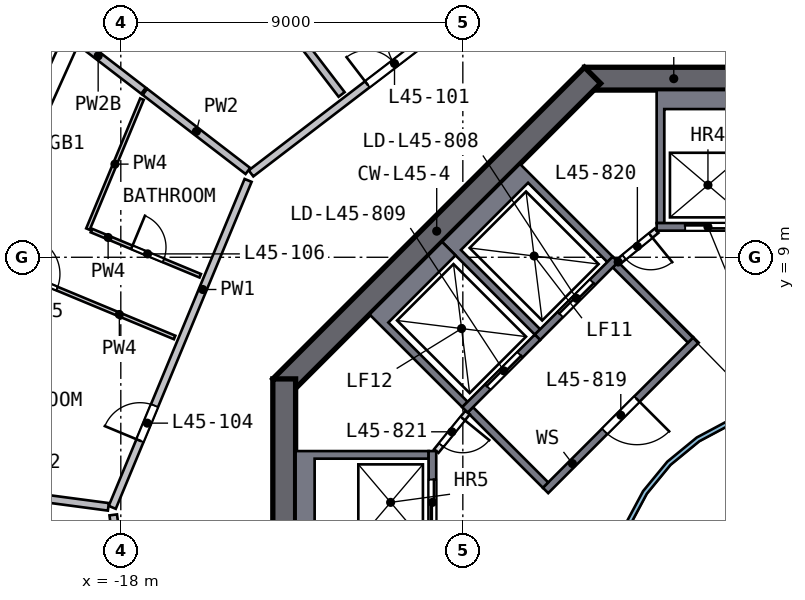
"""IFC4 building model, lengths in metres.
Left out: names, types, materials, properties, quantities, classifications, styles, units other than length and angle.
Written with IfcOpenShell. Run it as: python <this file> out.ifc"""

import sys

from ifc_helpers import new_model, si_unit, direction, frame, frame_2d, origin, place, context, subcontext, project, spatial, polyline, rectangle, outline, extrude, element, fill, save


model = new_model("IFC4")
c1 = context("Model", 3, precision=1e-05, world=origin(), true_north=direction((0.0, 1.0)))
c2 = subcontext(c1, "Body", "Model", "MODEL_VIEW")
j1 = project(units=[si_unit("LENGTHUNIT", "METRE"), si_unit("PLANEANGLEUNIT", "RADIAN")], contexts=[c1])
p1 = place(None, origin())
s1 = spatial("IfcSite", under=j1, at=p1, CompositionType="ELEMENT")
p2 = place(p1, origin())
s2 = spatial("IfcBuilding", under=s1, at=p2, CompositionType="ELEMENT")
p3 = place(p2, frame((0.0, 0.0, 187.0)))
s3 = spatial("IfcBuildingStorey", under=s2, at=p3, CompositionType="ELEMENT", Elevation=187.0)
p4 = place(p3, frame((5.799, 13.7, 0.0), z_axis=(0.0, 0.0, 1.0), x_axis=(-1.0, 0.0, 0.0)))
e1 = element("IfcWall", 1, at=p4, inside=s3, PredefinedType="SHEAR", context=c2, shape_type="SweptSolid", body=[
    extrude(rectangle(XDim=11.598, YDim=0.6, at=frame_2d((5.799, 0.0))), origin(), (0.0, 0.0, 1.0), 3.5),
])
p5 = place(p4, frame((4.899, 0.0, 0.0)))
e2 = element("IfcOpeningElement", 2, at=p5, cuts=e1, PredefinedType="OPENING", context=c2, shape_type="SweptSolid", body=[
    extrude(rectangle(XDim=1.8, YDim=2.1, at=frame_2d((0.9, 1.05))), frame((0.0, 0.31, 0.0), z_axis=(0.0, -1.0, 0.0), x_axis=(1.0, 0.0, 0.0)), (0.0, 0.0, 1.0), 0.62),
])
p6 = place(p3, frame((-5.587, 13.788, 0.0), z_axis=(0.0, 0.0, 1.0), x_axis=(-0.707106781, -0.707106781, 0.0)))
e3 = element("IfcWall", 3, at=p6, inside=s3, PredefinedType="SHEAR", context=c2, shape_type="SweptSolid", body=[
    extrude(rectangle(XDim=11.598, YDim=0.6, at=frame_2d((5.799, 0.0))), origin(), (0.0, 0.0, 1.0), 3.5),
])
p7 = place(p3, frame((-13.7, 5.799, 0.0), z_axis=(0.0, 0.0, 1.0), x_axis=(0.0, -1.0, 0.0)))
e4 = element("IfcWall", 4, at=p7, inside=s3, PredefinedType="SHEAR", context=c2, shape_type="SweptSolid", body=[
    extrude(rectangle(XDim=11.598, YDim=0.6, at=frame_2d((5.799, 0.0))), origin(), (0.0, 0.0, 1.0), 3.5),
])
p8 = place(p7, frame((4.899, 0.0, 0.0)))
e5 = element("IfcOpeningElement", 5, at=p8, cuts=e4, PredefinedType="OPENING", context=c2, shape_type="SweptSolid", body=[
    extrude(rectangle(XDim=1.8, YDim=2.1, at=frame_2d((0.9, 1.05))), frame((0.0, 0.31, 0.0), z_axis=(0.0, -1.0, 0.0), x_axis=(1.0, 0.0, 0.0)), (0.0, 0.0, 1.0), 0.62),
])
p9 = place(p3, origin())
e6 = element("IfcWall", 6, at=p9, inside=s3, PredefinedType="SOLIDWALL", context=c2, shape_type="SweptSolid", body=[
    extrude(outline(polyline([(-3.9, 13.4), (-1.2, 13.4), (-1.2, 9.9), (-1.4, 9.9), (-1.4, 12.9), (-3.7, 12.9), (-3.7, 9.9), (-3.9, 9.9), (-3.9, 13.4)])), origin(), (0.0, 0.0, 1.0), 3.19),
])
p10 = place(p3, frame((-1.2, 9.8, 0.0), z_axis=(0.0, 0.0, 1.0), x_axis=(-1.0, 0.0, 0.0)))
e7 = element("IfcWall", 7, at=p10, inside=s3, PredefinedType="SOLIDWALL", context=c2, shape_type="SweptSolid", body=[
    extrude(rectangle(XDim=2.7, YDim=0.2, at=frame_2d((1.35, 0.0))), origin(), (0.0, 0.0, 1.0), 3.19),
])
p11 = place(p10, frame((0.75, 0.0, 0.0)))
e8 = element("IfcOpeningElement", 8, at=p11, cuts=e7, PredefinedType="OPENING", context=c2, shape_type="SweptSolid", body=[
    extrude(rectangle(XDim=1.2, YDim=2.1, at=frame_2d((0.6, 1.05))), frame((0.0, 0.11, 0.0), z_axis=(0.0, -1.0, 0.0), x_axis=(1.0, 0.0, 0.0)), (0.0, 0.0, 1.0), 0.22),
])
p12 = place(p3, origin())
e9 = element("IfcWall", 9, at=p12, inside=s3, PredefinedType="SOLIDWALL", context=c2, shape_type="SweptSolid", body=[
    extrude(outline(polyline([(-13.4, 3.9), (-9.9, 3.9), (-9.9, 3.7), (-12.9, 3.7), (-12.9, 1.4), (-9.9, 1.4), (-9.9, 1.2), (-13.4, 1.2), (-13.4, 3.9)])), origin(), (0.0, 0.0, 1.0), 3.19),
])
p13 = place(p3, frame((-9.8, 1.2, 0.0), z_axis=(0.0, 0.0, 1.0), x_axis=(0.0, 1.0, 0.0)))
e10 = element("IfcWall", 10, at=p13, inside=s3, PredefinedType="SOLIDWALL", context=c2, shape_type="SweptSolid", body=[
    extrude(rectangle(XDim=2.7, YDim=0.2, at=frame_2d((1.35, 0.0))), origin(), (0.0, 0.0, 1.0), 3.19),
])
p14 = place(p13, frame((0.75, 0.0, 0.0)))
e11 = element("IfcOpeningElement", 11, at=p14, cuts=e10, PredefinedType="OPENING", context=c2, shape_type="SweptSolid", body=[
    extrude(rectangle(XDim=1.2, YDim=2.1, at=frame_2d((0.6, 1.05))), frame((0.0, 0.11, 0.0), z_axis=(0.0, -1.0, 0.0), x_axis=(1.0, 0.0, 0.0)), (0.0, 0.0, 1.0), 0.22),
])
p15 = place(p3, origin())
e12 = element("IfcWall", 12, at=p15, inside=s3, PredefinedType="SOLIDWALL", context=c2, shape_type="SweptSolid", body=[
    extrude(outline(polyline([(-9.546, 9.405), (-7.495, 11.455), (-5.056, 9.016), (-5.197, 8.874), (-7.283, 10.96), (-9.051, 9.192), (-6.965, 7.106), (-7.106, 6.965), (-9.546, 9.405)])), origin(), (0.0, 0.0, 1.0), 3.19),
])
p16 = place(p3, frame((-4.985, 8.945, 0.0), z_axis=(0.0, 0.0, 1.0), x_axis=(-0.707106781, -0.707106781, 0.0)))
e13 = element("IfcWall", 13, at=p16, inside=s3, PredefinedType="SOLIDWALL", context=c2, shape_type="SweptSolid", body=[
    extrude(rectangle(XDim=2.9, YDim=0.2, at=frame_2d((1.45, 0.0))), origin(), (0.0, 0.0, 1.0), 3.19),
])
p17 = place(p16, frame((0.85, 0.0, 0.0)))
e14 = element("IfcOpeningElement", 14, at=p17, cuts=e13, PredefinedType="OPENING", context=c2, shape_type="SweptSolid", body=[
    extrude(rectangle(XDim=1.2, YDim=2.1, at=frame_2d((0.6, 1.05))), frame((0.0, 0.11, 0.0), z_axis=(0.0, -1.0, 0.0), x_axis=(1.0, 0.0, 0.0)), (0.0, 0.0, 1.0), 0.22),
])
p18 = place(p3, origin())
e15 = element("IfcWall", 15, at=p18, inside=s3, PredefinedType="SOLIDWALL", context=c2, shape_type="SweptSolid", body=[
    extrude(outline(polyline([(-11.455, 7.495), (-9.546, 9.405), (-9.192, 9.051), (-10.96, 7.283), (-8.874, 5.197), (-9.016, 5.056), (-11.455, 7.495)])), origin(), (0.0, 0.0, 1.0), 3.19),
])
p19 = place(p3, frame((-7.036, 6.894, 0.0), z_axis=(0.0, 0.0, 1.0), x_axis=(-0.707106781, -0.707106781, 0.0)))
e16 = element("IfcWall", 16, at=p19, inside=s3, PredefinedType="SOLIDWALL", context=c2, shape_type="SweptSolid", body=[
    extrude(rectangle(XDim=2.7, YDim=0.2, at=frame_2d((1.35, 0.0))), origin(), (0.0, 0.0, 1.0), 3.19),
])
p20 = place(p19, frame((0.65, 0.0, 0.0)))
e17 = element("IfcOpeningElement", 17, at=p20, cuts=e16, PredefinedType="OPENING", context=c2, shape_type="SweptSolid", body=[
    extrude(rectangle(XDim=1.2, YDim=2.1, at=frame_2d((0.6, 1.05))), frame((0.0, 0.11, 0.0), z_axis=(0.0, -1.0, 0.0), x_axis=(1.0, 0.0, 0.0)), (0.0, 0.0, 1.0), 0.22),
])
p21 = place(p3, frame((-2.864, 6.823, 0.0), z_axis=(0.0, 0.0, 1.0), x_axis=(-0.707106781, -0.707106781, 0.0)))
e18 = element("IfcWall", 18, at=p21, inside=s3, PredefinedType="SOLIDWALL", context=c2, shape_type="SweptSolid", body=[
    extrude(rectangle(XDim=5.6, YDim=0.2, at=frame_2d((2.8, 0.0))), origin(), (0.0, 0.0, 1.0), 3.19),
])
p22 = place(p21, frame((2.2, 0.0, 0.0)))
e19 = element("IfcOpeningElement", 19, at=p22, cuts=e18, PredefinedType="OPENING", context=c2, shape_type="SweptSolid", body=[
    extrude(rectangle(XDim=1.2, YDim=2.1, at=frame_2d((0.6, 1.05))), frame((0.0, 0.11, 0.0), z_axis=(0.0, -1.0, 0.0), x_axis=(1.0, 0.0, 0.0)), (0.0, 0.0, 1.0), 0.22),
])
for number, where, z_axis, x_axis in (
    (20, (-3.005, 6.823, 0.0), (0.0, 0.0, 1.0), (-0.707, 0.707, 0.0)),
    (21, (-6.823, 3.005, 0.0), (0.0, 0.0, 1.0), (-0.707, 0.707, 0.0)),
):
    element("IfcWall", number, at=place(p3, frame(where, z_axis=z_axis, x_axis=x_axis)), inside=s3, PredefinedType="SOLIDWALL", context=c2, shape_type="SweptSolid", body=[
        extrude(rectangle(XDim=2.8, YDim=0.2, at=frame_2d((1.4, 0.0))), origin(), (0.0, 0.0, 1.0), 3.19),
    ])
p23 = place(p3, frame((-3.9, 9.7, 0.0), z_axis=(0.0, 0.0, 1.0), x_axis=(-0.775559878, -0.631274009, 0.0)))
e22 = element("IfcWall", 22, at=p23, inside=s3, PredefinedType="PARTITIONING", context=c2, shape_type="SweptSolid", body=[
    extrude(rectangle(XDim=1.308, YDim=0.15, at=frame_2d((0.654, 0.0))), origin(), (0.0, 0.0, 1.0), 3.19),
])
p24 = place(p23, frame((0.204, 0.0, 0.0)))
e23 = element("IfcOpeningElement", 23, at=p24, cuts=e22, PredefinedType="OPENING", context=c2, shape_type="SweptSolid", body=[
    extrude(rectangle(XDim=0.9, YDim=2.1, at=frame_2d((0.45, 1.05))), frame((0.0, 0.085, 0.0), z_axis=(0.0, -1.0, 0.0), x_axis=(1.0, 0.0, 0.0)), (0.0, 0.0, 1.0), 0.17),
])
p25 = place(p3, frame((-8.874, 4.914, 0.0), z_axis=(0.0, 0.0, 1.0), x_axis=(-0.631274009, -0.775559878, 0.0)))
e24 = element("IfcWall", 24, at=p25, inside=s3, PredefinedType="PARTITIONING", context=c2, shape_type="SweptSolid", body=[
    extrude(rectangle(XDim=1.308, YDim=0.15, at=frame_2d((0.654, 0.0))), origin(), (0.0, 0.0, 1.0), 3.19),
])
p26 = place(p25, frame((0.204, 0.0, 0.0)))
e25 = element("IfcOpeningElement", 25, at=p26, cuts=e24, PredefinedType="OPENING", context=c2, shape_type="SweptSolid", body=[
    extrude(rectangle(XDim=0.9, YDim=2.1, at=frame_2d((0.45, 1.05))), frame((0.0, 0.085, 0.0), z_axis=(0.0, -1.0, 0.0), x_axis=(1.0, 0.0, 0.0)), (0.0, 0.0, 1.0), 0.17),
])
p27 = place(p3, origin())
e26 = element("IfcWall", 26, at=p27, inside=s3, PredefinedType="SOLIDWALL", context=c2, shape_type="SweptSolid", body=[
    extrude(outline(polyline([(5.021, -0.999), (4.73, -1.959), (4.257, -2.844), (3.62, -3.62), (2.844, -4.257), (1.959, -4.73), (0.999, -5.021), (0.0, -5.12), (-0.999, -5.021), (-1.959, -4.73), (-2.844, -4.257), (-3.62, -3.62), (-4.257, -2.844), (-4.73, -1.959), (-5.021, -0.999), (-5.12, 0.0), (-5.021, 0.999), (-4.73, 1.959), (-4.257, 2.844), (-3.62, 3.62), (-2.844, 4.257), (-1.959, 4.73), (-0.999, 5.021), (0.0, 5.12), (0.999, 5.021), (1.959, 4.73), (2.844, 4.257), (3.62, 3.62), (4.257, 2.844), (4.73, 1.959), (5.021, 0.999), (5.12, 0.0), (5.021, -0.999)]), holes=[polyline([(4.904, 0.976), (4.619, 1.913), (4.157, 2.778), (3.535, 3.535), (2.778, 4.157), (1.913, 4.619), (0.976, 4.904), (0.0, 5.0), (-0.976, 4.904), (-1.913, 4.619), (-2.778, 4.157), (-3.535, 3.535), (-4.157, 2.778), (-4.619, 1.913), (-4.904, 0.976), (-5.0, 0.0), (-4.904, -0.976), (-4.619, -1.913), (-4.157, -2.778), (-3.535, -3.535), (-2.778, -4.157), (-1.913, -4.619), (-0.976, -4.904), (0.0, -5.0), (0.976, -4.904), (1.913, -4.619), (2.778, -4.157), (3.535, -3.535), (4.157, -2.778), (4.619, -1.913), (4.904, -0.976), (5.0, 0.0), (4.904, 0.976)])]), origin(), (0.0, 0.0, 1.0), 3.19),
])
p28 = place(p3, frame((-16.993, -7.018, 0.0), z_axis=(0.0, 0.0, 1.0), x_axis=(-0.129502741, 0.991579064, 0.0)))
e27 = element("IfcWall", 27, at=p28, inside=s3, PredefinedType="SOLIDWALL", context=c2, shape_type="SweptSolid", body=[
    extrude(rectangle(XDim=9.317, YDim=0.2, at=frame_2d((4.658, 0.0))), origin(), (0.0, 0.0, 1.0), 3.19),
])
p29 = place(p28, frame((1.9, 0.0, 0.0)))
e28 = element("IfcOpeningElement", 28, at=p29, cuts=e27, PredefinedType="OPENING", context=c2, shape_type="SweptSolid", body=[
    extrude(rectangle(XDim=1.0, YDim=2.1, at=frame_2d((0.5, 1.05))), frame((0.0, 0.11, 0.0), z_axis=(0.0, -1.0, 0.0), x_axis=(1.0, 0.0, 0.0)), (0.0, 0.0, 1.0), 0.22),
])
p30 = place(p3, frame((-18.225, 2.419, 0.0), z_axis=(0.0, 0.0, 1.0), x_axis=(0.383660652, 0.923474149, 0.0)))
e29 = element("IfcWall", 29, at=p30, inside=s3, PredefinedType="SOLIDWALL", context=c2, shape_type="SweptSolid", body=[
    extrude(rectangle(XDim=9.317, YDim=0.2, at=frame_2d((4.658, 0.0))), origin(), (0.0, 0.0, 1.0), 3.19),
])
p31 = place(p30, frame((1.9, 0.0, 0.0)))
e30 = element("IfcOpeningElement", 30, at=p31, cuts=e29, PredefinedType="OPENING", context=c2, shape_type="SweptSolid", body=[
    extrude(rectangle(XDim=1.0, YDim=2.1, at=frame_2d((0.5, 1.05))), frame((0.0, 0.11, 0.0), z_axis=(0.0, -1.0, 0.0), x_axis=(1.0, 0.0, 0.0)), (0.0, 0.0, 1.0), 0.22),
])
p32 = place(p3, frame((-14.574, 11.207, 0.0), z_axis=(0.0, 0.0, 1.0), x_axis=(0.793994332, 0.60792516, 0.0)))
e31 = element("IfcWall", 31, at=p32, inside=s3, PredefinedType="SOLIDWALL", context=c2, shape_type="SweptSolid", body=[
    extrude(rectangle(XDim=9.517, YDim=0.2, at=frame_2d((4.758, 0.0))), origin(), (0.0, 0.0, 1.0), 3.19),
])
p33 = place(p32, frame((3.856, 0.0, 0.0)))
e32 = element("IfcOpeningElement", 32, at=p33, cuts=e31, PredefinedType="OPENING", context=c2, shape_type="SweptSolid", body=[
    extrude(rectangle(XDim=1.8, YDim=2.1, at=frame_2d((0.9, 1.05))), frame((0.0, 0.11, 0.0), z_axis=(0.0, -1.0, 0.0), x_axis=(1.0, 0.0, 0.0)), (0.0, 0.0, 1.0), 0.22),
])
p34 = place(p3, frame((-18.328, 2.432, 0.0), z_axis=(0.0, 0.0, 1.0), x_axis=(-0.991308802, 0.131555534, 0.0)))
e33 = element("IfcWall", 33, at=p34, inside=s3, PredefinedType="SOLIDWALL", context=c2, shape_type="SweptSolid", body=[
    extrude(rectangle(XDim=3.418, YDim=0.2, at=frame_2d((1.709, 0.0))), origin(), (0.0, 0.0, 1.0), 3.19),
])
p35 = place(p3, frame((-17.402, 13.382, 0.0), z_axis=(0.0, 0.0, 1.0), x_axis=(-0.792684259, 0.609632402, 0.0)))
e34 = element("IfcWall", 34, at=p35, inside=s3, PredefinedType="SOLIDWALL", context=c2, shape_type="SweptSolid", body=[
    extrude(rectangle(XDim=3.011, YDim=0.2, at=frame_2d((1.506, 0.0))), origin(), (0.0, 0.0, 1.0), 2.69),
])
p36 = place(p3, frame((-12.19, 13.285, 0.0), z_axis=(0.0, 0.0, 1.0), x_axis=(-0.607936243, 0.793985846, 0.0)))
e35 = element("IfcWall", 35, at=p36, inside=s3, PredefinedType="SOLIDWALL", context=c2, shape_type="SweptSolid", body=[
    extrude(rectangle(XDim=14.108, YDim=0.2, at=frame_2d((7.054, 0.0))), origin(), (0.0, 0.0, 1.0), 3.19),
])
p37 = place(p36, frame((4.35, 0.0, 0.0)))
e36 = element("IfcOpeningElement", 36, at=p37, cuts=e35, PredefinedType="OPENING", context=c2, shape_type="SweptSolid", body=[
    extrude(rectangle(XDim=1.0, YDim=2.1, at=frame_2d((0.5, 1.05))), frame((0.0, 0.11, 0.0), z_axis=(0.0, -1.0, 0.0), x_axis=(1.0, 0.0, 0.0)), (0.0, 0.0, 1.0), 0.22),
])
p38 = place(p3, frame((-14.656, 11.27, 0.0), z_axis=(0.0, 0.0, 1.0), x_axis=(-0.792682395, 0.609634825, 0.0)))
e37 = element("IfcWall", 37, at=p38, inside=s3, PredefinedType="SOLIDWALL", context=c2, shape_type="SweptSolid", body=[
    extrude(rectangle(XDim=3.418, YDim=0.2, at=frame_2d((1.709, 0.0))), origin(), (0.0, 0.0, 1.0), 3.19),
])
p39 = place(p3, frame((-22.263, 9.249, 0.0), z_axis=(0.0, 0.0, 1.0), x_axis=(0.923469886, -0.383670913, 0.0)))
e38 = element("IfcWall", 38, at=p39, inside=s3, PredefinedType="PARTITIONING", context=c2, shape_type="SweptSolid", body=[
    extrude(rectangle(XDim=6.15, YDim=0.1, at=frame_2d((3.075, 0.0))), origin(), (0.0, 0.0, 1.0), 3.19),
])
p40 = place(p39, frame((1.8, 0.0, 0.0)))
e39 = element("IfcOpeningElement", 39, at=p40, cuts=e38, PredefinedType="OPENING", context=c2, shape_type="SweptSolid", body=[
    extrude(rectangle(XDim=1.0, YDim=2.1, at=frame_2d((0.5, 1.05))), frame((0.0, 0.06, 0.0), z_axis=(0.0, -1.0, 0.0), x_axis=(1.0, 0.0, 0.0)), (0.0, 0.0, 1.0), 0.12),
])
p41 = place(p3, frame((-17.444, 13.162, 0.0), z_axis=(0.0, 0.0, 1.0), x_axis=(-0.383688487, -0.923462584, 0.0)))
e40 = element("IfcWall", 40, at=p41, inside=s3, PredefinedType="PARTITIONING", context=c2, shape_type="SweptSolid", body=[
    extrude(rectangle(XDim=3.704, YDim=0.1, at=frame_2d((1.852, 0.0))), origin(), (0.0, 0.0, 1.0), 3.19),
])
p42 = place(p3, frame((-18.772, 9.703, 0.0), z_axis=(0.0, 0.0, 1.0), x_axis=(0.923463234, -0.383686924, 0.0)))
e41 = element("IfcWall", 41, at=p42, inside=s3, PredefinedType="PARTITIONING", context=c2, shape_type="SweptSolid", body=[
    extrude(rectangle(XDim=3.1, YDim=0.1, at=frame_2d((1.55, 0.0))), origin(), (0.0, 0.0, 1.0), 3.19),
])
p43 = place(p42, frame((1.15, 0.0, 0.0)))
e42 = element("IfcOpeningElement", 42, at=p43, cuts=e41, PredefinedType="OPENING", context=c2, shape_type="SweptSolid", body=[
    extrude(rectangle(XDim=0.9, YDim=2.1, at=frame_2d((0.45, 1.05))), frame((0.0, 0.06, 0.0), z_axis=(0.0, -1.0, 0.0), x_axis=(1.0, 0.0, 0.0)), (0.0, 0.0, 1.0), 0.12),
])
p44 = place(p11, origin())
e43 = element("IfcDoor", 43, at=p44, inside=s3, OperationType="DOUBLE_DOOR_SLIDING", PredefinedType="DOOR", context=c2, shape_type="SweptSolid", body=[
    extrude(rectangle(XDim=1.2, YDim=2.1, at=frame_2d((0.6, 1.05))), frame((0.0, 0.025, 0.0), z_axis=(0.0, -1.0, 0.0), x_axis=(1.0, 0.0, 0.0)), (0.0, 0.0, 1.0), 0.05),
])
fill(e8, e43)
p45 = place(p14, origin())
e44 = element("IfcDoor", 44, at=p45, inside=s3, OperationType="DOUBLE_DOOR_SLIDING", PredefinedType="DOOR", context=c2, shape_type="SweptSolid", body=[
    extrude(rectangle(XDim=1.2, YDim=2.1, at=frame_2d((0.6, 1.05))), frame((0.0, 0.025, 0.0), z_axis=(0.0, -1.0, 0.0), x_axis=(1.0, 0.0, 0.0)), (0.0, 0.0, 1.0), 0.05),
])
fill(e11, e44)
p46 = place(p17, origin())
e45 = element("IfcDoor", 45, at=p46, inside=s3, OperationType="DOUBLE_DOOR_SLIDING", PredefinedType="DOOR", context=c2, shape_type="SweptSolid", body=[
    extrude(rectangle(XDim=1.2, YDim=2.1, at=frame_2d((0.6, 1.05))), frame((0.0, 0.025, 0.0), z_axis=(0.0, -1.0, 0.0), x_axis=(1.0, 0.0, 0.0)), (0.0, 0.0, 1.0), 0.05),
])
fill(e14, e45)
p47 = place(p20, origin())
e46 = element("IfcDoor", 46, at=p47, inside=s3, OperationType="DOUBLE_DOOR_SLIDING", PredefinedType="DOOR", context=c2, shape_type="SweptSolid", body=[
    extrude(rectangle(XDim=1.2, YDim=2.1, at=frame_2d((0.6, 1.05))), frame((0.0, 0.025, 0.0), z_axis=(0.0, -1.0, 0.0), x_axis=(1.0, 0.0, 0.0)), (0.0, 0.0, 1.0), 0.05),
])
fill(e17, e46)
p48 = place(p22, origin())
e47 = element("IfcDoor", 47, at=p48, inside=s3, OperationType="SINGLE_SWING_LEFT", PredefinedType="DOOR", context=c2, shape_type="SweptSolid", body=[
    extrude(rectangle(XDim=1.2, YDim=2.1, at=frame_2d((0.6, 1.05))), frame((0.0, 0.025, 0.0), z_axis=(0.0, -1.0, 0.0), x_axis=(1.0, 0.0, 0.0)), (0.0, 0.0, 1.0), 0.05),
])
fill(e19, e47)
p49 = place(p24, origin())
e48 = element("IfcDoor", 48, at=p49, inside=s3, OperationType="SINGLE_SWING_LEFT", PredefinedType="DOOR", context=c2, shape_type="SweptSolid", body=[
    extrude(rectangle(XDim=0.9, YDim=2.1, at=frame_2d((0.45, 1.05))), frame((0.0, 0.025, 0.0), z_axis=(0.0, -1.0, 0.0), x_axis=(1.0, 0.0, 0.0)), (0.0, 0.0, 1.0), 0.05),
])
fill(e23, e48)
p50 = place(p26, origin())
e49 = element("IfcDoor", 49, at=p50, inside=s3, OperationType="SINGLE_SWING_LEFT", PredefinedType="DOOR", context=c2, shape_type="SweptSolid", body=[
    extrude(rectangle(XDim=0.9, YDim=2.1, at=frame_2d((0.45, 1.05))), frame((0.0, 0.025, 0.0), z_axis=(0.0, -1.0, 0.0), x_axis=(1.0, 0.0, 0.0)), (0.0, 0.0, 1.0), 0.05),
])
fill(e25, e49)
p51 = place(p33, origin())
e50 = element("IfcDoor", 50, at=p51, inside=s3, OperationType="DOUBLE_DOOR_SINGLE_SWING", PredefinedType="DOOR", context=c2, shape_type="SweptSolid", body=[
    extrude(rectangle(XDim=1.8, YDim=2.1, at=frame_2d((0.9, 1.05))), frame((0.0, 0.025, 0.0), z_axis=(0.0, -1.0, 0.0), x_axis=(1.0, 0.0, 0.0)), (0.0, 0.0, 1.0), 0.05),
])
fill(e32, e50)
p52 = place(p31, origin())
e51 = element("IfcDoor", 51, at=p52, inside=s3, OperationType="SINGLE_SWING_LEFT", PredefinedType="DOOR", context=c2, shape_type="SweptSolid", body=[
    extrude(rectangle(XDim=1.0, YDim=2.1, at=frame_2d((0.5, 1.05))), frame((0.0, 0.025, 0.0), z_axis=(0.0, -1.0, 0.0), x_axis=(1.0, 0.0, 0.0)), (0.0, 0.0, 1.0), 0.05),
])
fill(e30, e51)
p53 = place(p40, origin())
e52 = element("IfcDoor", 52, at=p53, inside=s3, OperationType="SINGLE_SWING_LEFT", PredefinedType="DOOR", context=c2, shape_type="SweptSolid", body=[
    extrude(rectangle(XDim=1.0, YDim=2.1, at=frame_2d((0.5, 1.05))), frame((0.0, 0.025, 0.0), z_axis=(0.0, -1.0, 0.0), x_axis=(1.0, 0.0, 0.0)), (0.0, 0.0, 1.0), 0.05),
])
fill(e39, e52)
p54 = place(p43, origin())
e53 = element("IfcDoor", 53, at=p54, inside=s3, OperationType="SINGLE_SWING_LEFT", PredefinedType="DOOR", context=c2, shape_type="SweptSolid", body=[
    extrude(rectangle(XDim=0.9, YDim=2.1, at=frame_2d((0.45, 1.05))), frame((0.0, 0.025, 0.0), z_axis=(0.0, -1.0, 0.0), x_axis=(1.0, 0.0, 0.0)), (0.0, 0.0, 1.0), 0.05),
])
fill(e42, e53)
save(model, sys.argv[1])
